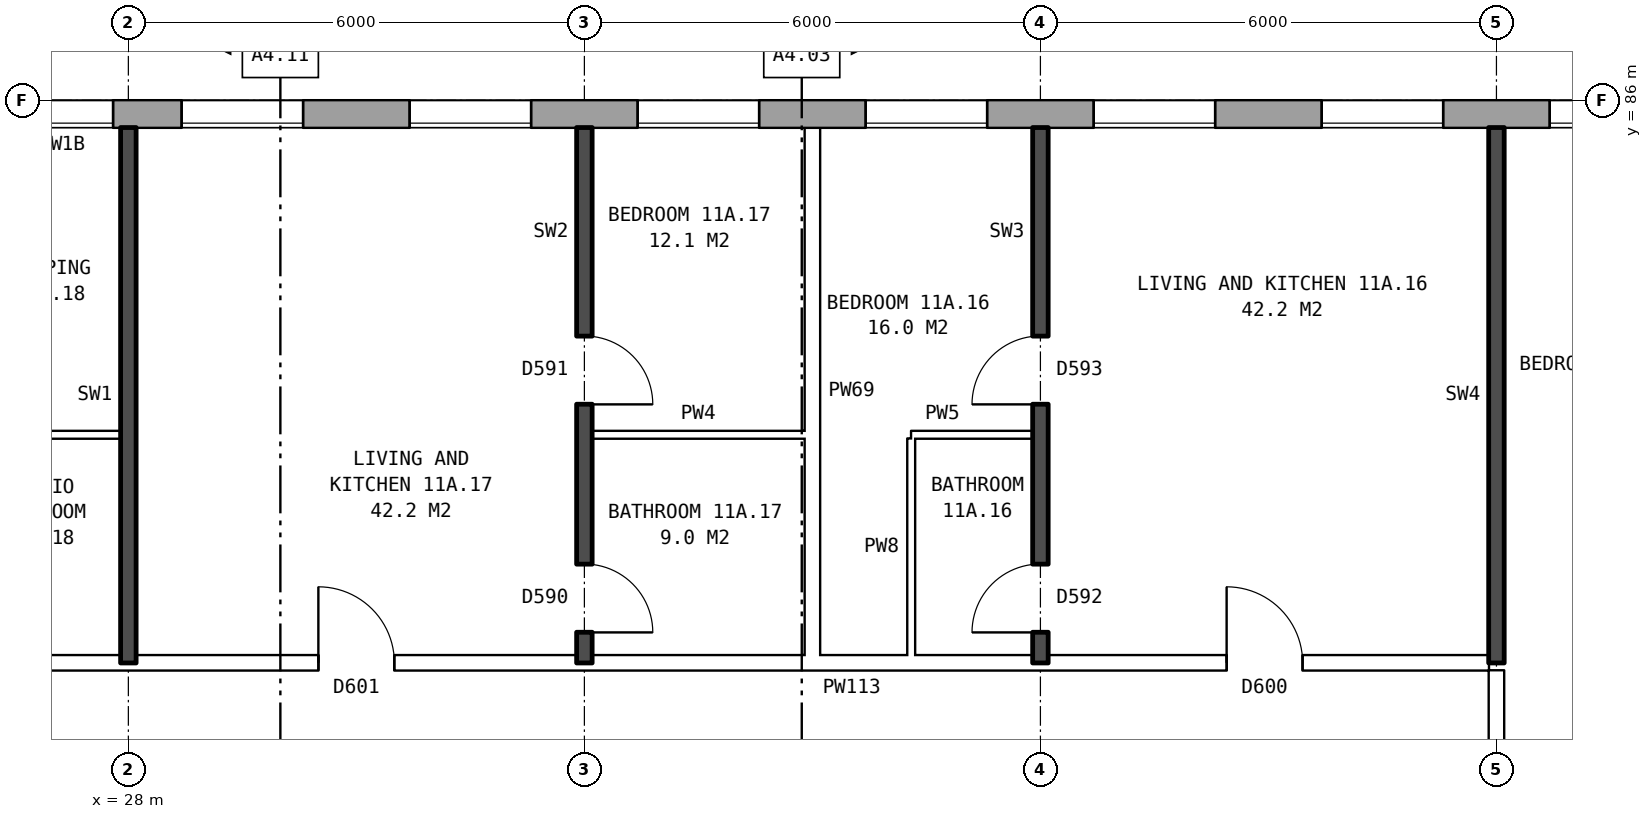
"""IFC4 building model, lengths in metres.
Left out: names, types, materials, properties, quantities, classifications, styles, units other than length and angle.
Written with IfcOpenShell. Run it as: python <this file> out.ifc"""

import sys

from ifc_helpers import new_model, si_unit, direction, frame, frame_2d, origin, place, context, subcontext, project, spatial, rectangle, extrude, element, fill, save


model = new_model("IFC4")
c1 = context("Model", 3, precision=1e-05, world=origin(), true_north=direction((0.0, 1.0)))
c2 = subcontext(c1, "Body", "Model", "MODEL_VIEW")
j1 = project(units=[si_unit("LENGTHUNIT", "METRE"), si_unit("PLANEANGLEUNIT", "RADIAN")], contexts=[c1])
p1 = place(None, origin())
s1 = spatial("IfcSite", under=j1, at=p1, CompositionType="ELEMENT")
p2 = place(p1, origin())
s2 = spatial("IfcBuilding", under=s1, at=p2, CompositionType="ELEMENT")
p3 = place(p2, frame((0.0, 0.0, 44.3)))
s3 = spatial("IfcBuildingStorey", under=s2, at=p3, CompositionType="ELEMENT", Elevation=44.3)
p4 = place(p3, frame((72.925, 85.82, 0.0), z_axis=(0.0, 0.0, 1.0), x_axis=(-1.0, 0.0, 0.0)))
e1 = element("IfcWall", 1, at=p4, inside=s3, PredefinedType="STANDARD", context=c2, shape_type="SweptSolid", body=[
    extrude(rectangle(XDim=48.351, YDim=0.36, at=frame_2d((24.175, 0.0))), origin(), (0.0, 0.0, 1.0), 2.85),
])
p5 = place(p4, frame((0.65, 0.0, 0.8)))
e2 = element("IfcOpeningElement", 2, at=p5, cuts=e1, PredefinedType="OPENING", context=c2, shape_type="SweptSolid", body=[
    extrude(rectangle(XDim=0.6, YDim=0.9, at=frame_2d((0.3, 0.45))), frame((0.0, 0.19, 0.0), z_axis=(0.0, -1.0, 0.0), x_axis=(1.0, 0.0, 0.0)), (0.0, 0.0, 1.0), 0.38),
])
p6 = place(p4, frame((3.625, 0.0, 0.8)))
e3 = element("IfcOpeningElement", 3, at=p6, cuts=e1, PredefinedType="OPENING", context=c2, shape_type="SweptSolid", body=[
    extrude(rectangle(XDim=1.6, YDim=1.8, at=frame_2d((0.8, 0.9))), frame((0.0, 0.19, 0.0), z_axis=(0.0, -1.0, 0.0), x_axis=(1.0, 0.0, 0.0)), (0.0, 0.0, 1.0), 0.38),
])
p7 = place(p4, frame((6.625, 0.0, 0.8)))
e4 = element("IfcOpeningElement", 4, at=p7, cuts=e1, PredefinedType="OPENING", context=c2, shape_type="SweptSolid", body=[
    extrude(rectangle(XDim=1.6, YDim=1.8, at=frame_2d((0.8, 0.9))), frame((0.0, 0.19, 0.0), z_axis=(0.0, -1.0, 0.0), x_axis=(1.0, 0.0, 0.0)), (0.0, 0.0, 1.0), 0.38),
])
p8 = place(p4, frame((9.625, 0.0, 0.8)))
e5 = element("IfcOpeningElement", 5, at=p8, cuts=e1, PredefinedType="OPENING", context=c2, shape_type="SweptSolid", body=[
    extrude(rectangle(XDim=1.6, YDim=1.8, at=frame_2d((0.8, 0.9))), frame((0.0, 0.19, 0.0), z_axis=(0.0, -1.0, 0.0), x_axis=(1.0, 0.0, 0.0)), (0.0, 0.0, 1.0), 0.38),
])
p9 = place(p4, frame((12.625, 0.0, 0.8)))
e6 = element("IfcOpeningElement", 6, at=p9, cuts=e1, PredefinedType="OPENING", context=c2, shape_type="SweptSolid", body=[
    extrude(rectangle(XDim=1.6, YDim=1.8, at=frame_2d((0.8, 0.9))), frame((0.0, 0.19, 0.0), z_axis=(0.0, -1.0, 0.0), x_axis=(1.0, 0.0, 0.0)), (0.0, 0.0, 1.0), 0.38),
])
p10 = place(p4, frame((15.625, 0.0, 0.8)))
e7 = element("IfcOpeningElement", 7, at=p10, cuts=e1, PredefinedType="OPENING", context=c2, shape_type="SweptSolid", body=[
    extrude(rectangle(XDim=1.6, YDim=1.8, at=frame_2d((0.8, 0.9))), frame((0.0, 0.19, 0.0), z_axis=(0.0, -1.0, 0.0), x_axis=(1.0, 0.0, 0.0)), (0.0, 0.0, 1.0), 0.38),
])
p11 = place(p4, frame((18.625, 0.0, 0.8)))
e8 = element("IfcOpeningElement", 8, at=p11, cuts=e1, PredefinedType="OPENING", context=c2, shape_type="SweptSolid", body=[
    extrude(rectangle(XDim=1.6, YDim=1.8, at=frame_2d((0.8, 0.9))), frame((0.0, 0.19, 0.0), z_axis=(0.0, -1.0, 0.0), x_axis=(1.0, 0.0, 0.0)), (0.0, 0.0, 1.0), 0.38),
])
p12 = place(p4, frame((21.625, 0.0, 0.8)))
e9 = element("IfcOpeningElement", 9, at=p12, cuts=e1, PredefinedType="OPENING", context=c2, shape_type="SweptSolid", body=[
    extrude(rectangle(XDim=1.6, YDim=1.8, at=frame_2d((0.8, 0.9))), frame((0.0, 0.19, 0.0), z_axis=(0.0, -1.0, 0.0), x_axis=(1.0, 0.0, 0.0)), (0.0, 0.0, 1.0), 0.38),
])
p13 = place(p4, frame((24.625, 0.0, 0.8)))
e10 = element("IfcOpeningElement", 10, at=p13, cuts=e1, PredefinedType="OPENING", context=c2, shape_type="SweptSolid", body=[
    extrude(rectangle(XDim=1.6, YDim=1.8, at=frame_2d((0.8, 0.9))), frame((0.0, 0.19, 0.0), z_axis=(0.0, -1.0, 0.0), x_axis=(1.0, 0.0, 0.0)), (0.0, 0.0, 1.0), 0.38),
])
p14 = place(p4, frame((27.625, 0.0, 0.8)))
e11 = element("IfcOpeningElement", 11, at=p14, cuts=e1, PredefinedType="OPENING", context=c2, shape_type="SweptSolid", body=[
    extrude(rectangle(XDim=1.6, YDim=1.8, at=frame_2d((0.8, 0.9))), frame((0.0, 0.19, 0.0), z_axis=(0.0, -1.0, 0.0), x_axis=(1.0, 0.0, 0.0)), (0.0, 0.0, 1.0), 0.38),
])
p15 = place(p4, frame((30.625, 0.0, 0.8)))
e12 = element("IfcOpeningElement", 12, at=p15, cuts=e1, PredefinedType="OPENING", context=c2, shape_type="SweptSolid", body=[
    extrude(rectangle(XDim=1.6, YDim=1.8, at=frame_2d((0.8, 0.9))), frame((0.0, 0.19, 0.0), z_axis=(0.0, -1.0, 0.0), x_axis=(1.0, 0.0, 0.0)), (0.0, 0.0, 1.0), 0.38),
])
p16 = place(p4, frame((33.625, 0.0, 0.8)))
e13 = element("IfcOpeningElement", 13, at=p16, cuts=e1, PredefinedType="OPENING", context=c2, shape_type="SweptSolid", body=[
    extrude(rectangle(XDim=1.6, YDim=1.8, at=frame_2d((0.8, 0.9))), frame((0.0, 0.19, 0.0), z_axis=(0.0, -1.0, 0.0), x_axis=(1.0, 0.0, 0.0)), (0.0, 0.0, 1.0), 0.38),
])
p17 = place(p4, frame((36.625, 0.0, 0.8)))
e14 = element("IfcOpeningElement", 14, at=p17, cuts=e1, PredefinedType="OPENING", context=c2, shape_type="SweptSolid", body=[
    extrude(rectangle(XDim=1.6, YDim=1.8, at=frame_2d((0.8, 0.9))), frame((0.0, 0.19, 0.0), z_axis=(0.0, -1.0, 0.0), x_axis=(1.0, 0.0, 0.0)), (0.0, 0.0, 1.0), 0.38),
])
p18 = place(p4, frame((39.625, 0.0, 0.8)))
e15 = element("IfcOpeningElement", 15, at=p18, cuts=e1, PredefinedType="OPENING", context=c2, shape_type="SweptSolid", body=[
    extrude(rectangle(XDim=1.6, YDim=1.8, at=frame_2d((0.8, 0.9))), frame((0.0, 0.19, 0.0), z_axis=(0.0, -1.0, 0.0), x_axis=(1.0, 0.0, 0.0)), (0.0, 0.0, 1.0), 0.38),
])
p19 = place(p4, frame((42.625, 0.0, 0.8)))
e16 = element("IfcOpeningElement", 16, at=p19, cuts=e1, PredefinedType="OPENING", context=c2, shape_type="SweptSolid", body=[
    extrude(rectangle(XDim=1.6, YDim=1.8, at=frame_2d((0.8, 0.9))), frame((0.0, 0.19, 0.0), z_axis=(0.0, -1.0, 0.0), x_axis=(1.0, 0.0, 0.0)), (0.0, 0.0, 1.0), 0.38),
])
p20 = place(p4, frame((45.125, 0.0, 0.8)))
e17 = element("IfcOpeningElement", 17, at=p20, cuts=e1, PredefinedType="OPENING", context=c2, shape_type="SweptSolid", body=[
    extrude(rectangle(XDim=1.2, YDim=1.8, at=frame_2d((0.6, 0.9))), frame((0.0, 0.19, 0.0), z_axis=(0.0, -1.0, 0.0), x_axis=(1.0, 0.0, 0.0)), (0.0, 0.0, 1.0), 0.38),
])
p21 = place(p4, frame((1.55, 0.0, 0.8)))
e18 = element("IfcOpeningElement", 18, at=p21, cuts=e1, PredefinedType="OPENING", context=c2, shape_type="SweptSolid", body=[
    extrude(rectangle(XDim=1.0, YDim=1.5, at=frame_2d((0.5, 0.75))), frame((0.0, 0.19, 0.0), z_axis=(0.0, -1.0, 0.0), x_axis=(1.0, 0.0, 0.0)), (0.0, 0.0, 1.0), 0.38),
])
p22 = place(p4, frame((46.625, 0.0, 0.8)))
e19 = element("IfcOpeningElement", 19, at=p22, cuts=e1, PredefinedType="OPENING", context=c2, shape_type="SweptSolid", body=[
    extrude(rectangle(XDim=1.0, YDim=0.9, at=frame_2d((0.5, 0.45))), frame((0.0, 0.19, 0.0), z_axis=(0.0, -1.0, 0.0), x_axis=(1.0, 0.0, 0.0)), (0.0, 0.0, 1.0), 0.38),
])
p23 = place(p3, frame((21.86, 78.6, 0.0), z_axis=(0.0, 0.0, 1.0), x_axis=(1.0, 0.0, 0.0)))
e20 = element("IfcWall", 20, at=p23, inside=s3, PredefinedType="PARTITIONING", context=c2, shape_type="SweptSolid", body=[
    extrude(rectangle(XDim=24.04, YDim=0.2, at=frame_2d((12.02, 0.0))), origin(), (0.0, 0.0, 1.0), 2.85),
])
p24 = place(p23, frame((20.59, 0.0, 0.0)))
e21 = element("IfcOpeningElement", 21, at=p24, cuts=e20, PredefinedType="OPENING", context=c2, shape_type="SweptSolid", body=[
    extrude(rectangle(XDim=1.0, YDim=2.1, at=frame_2d((0.5, 1.05))), frame((0.0, 0.11, 0.0), z_axis=(0.0, -1.0, 0.0), x_axis=(1.0, 0.0, 0.0)), (0.0, 0.0, 1.0), 0.22),
])
p25 = place(p23, frame((8.64, 0.0, 0.0)))
e22 = element("IfcOpeningElement", 22, at=p25, cuts=e20, PredefinedType="OPENING", context=c2, shape_type="SweptSolid", body=[
    extrude(rectangle(XDim=1.0, YDim=2.1, at=frame_2d((0.5, 1.05))), frame((0.0, 0.11, 0.0), z_axis=(0.0, -1.0, 0.0), x_axis=(1.0, 0.0, 0.0)), (0.0, 0.0, 1.0), 0.22),
])
p26 = place(p23, frame((1.37, 0.0, 0.0)))
e23 = element("IfcOpeningElement", 23, at=p26, cuts=e20, PredefinedType="OPENING", context=c2, shape_type="SweptSolid", body=[
    extrude(rectangle(XDim=1.0, YDim=2.1, at=frame_2d((0.5, 1.05))), frame((0.0, 0.11, 0.0), z_axis=(0.0, -1.0, 0.0), x_axis=(1.0, 0.0, 0.0)), (0.0, 0.0, 1.0), 0.22),
])
p27 = place(p3, frame((25.6, 81.6, 0.0), z_axis=(0.0, 0.0, 1.0), x_axis=(1.0, 0.0, 0.0)))
e24 = element("IfcWall", 24, at=p27, inside=s3, PredefinedType="PARTITIONING", context=c2, shape_type="SweptSolid", body=[
    extrude(rectangle(XDim=2.3, YDim=0.1, at=frame_2d((1.15, 0.0))), origin(), (0.0, 0.0, 1.0), 2.85),
])
p28 = place(p3, frame((34.1, 81.6, 0.0), z_axis=(0.0, 0.0, 1.0), x_axis=(1.0, 0.0, 0.0)))
e25 = element("IfcWall", 25, at=p28, inside=s3, PredefinedType="PARTITIONING", context=c2, shape_type="SweptSolid", body=[
    extrude(rectangle(XDim=2.8, YDim=0.1, at=frame_2d((1.4, 0.0))), origin(), (0.0, 0.0, 1.0), 2.85),
])
p29 = place(p3, frame((38.3, 81.6, 0.0), z_axis=(0.0, 0.0, 1.0), x_axis=(1.0, 0.0, 0.0)))
e26 = element("IfcWall", 26, at=p29, inside=s3, PredefinedType="PARTITIONING", context=c2, shape_type="SweptSolid", body=[
    extrude(rectangle(XDim=1.6, YDim=0.1, at=frame_2d((0.8, 0.0))), origin(), (0.0, 0.0, 1.0), 2.85),
])
p30 = place(p3, frame((28.0, 78.6, 0.0), z_axis=(0.0, 0.0, 1.0), x_axis=(0.0, 1.0, 0.0)))
e27 = element("IfcWall", 27, at=p30, inside=s3, PredefinedType="SOLIDWALL", context=c2, shape_type="SweptSolid", body=[
    extrude(rectangle(XDim=7.04, YDim=0.2, at=frame_2d((3.52, 0.0))), origin(), (0.0, 0.0, 1.0), 2.85),
])
p31 = place(p3, frame((34.0, 78.6, 0.0), z_axis=(0.0, 0.0, 1.0), x_axis=(0.0, 1.0, 0.0)))
e28 = element("IfcWall", 28, at=p31, inside=s3, PredefinedType="SOLIDWALL", context=c2, shape_type="SweptSolid", body=[
    extrude(rectangle(XDim=7.04, YDim=0.2, at=frame_2d((3.52, 0.0))), origin(), (0.0, 0.0, 1.0), 2.85),
])
p32 = place(p31, frame((3.4, 0.0, 0.0)))
e29 = element("IfcOpeningElement", 29, at=p32, cuts=e28, PredefinedType="OPENING", context=c2, shape_type="SweptSolid", body=[
    extrude(rectangle(XDim=0.9, YDim=2.1, at=frame_2d((0.45, 1.05))), frame((0.0, 0.11, 0.0), z_axis=(0.0, -1.0, 0.0), x_axis=(1.0, 0.0, 0.0)), (0.0, 0.0, 1.0), 0.22),
])
p33 = place(p31, frame((0.4, 0.0, 0.0)))
e30 = element("IfcOpeningElement", 30, at=p33, cuts=e28, PredefinedType="OPENING", context=c2, shape_type="SweptSolid", body=[
    extrude(rectangle(XDim=0.9, YDim=2.1, at=frame_2d((0.45, 1.05))), frame((0.0, 0.11, 0.0), z_axis=(0.0, -1.0, 0.0), x_axis=(1.0, 0.0, 0.0)), (0.0, 0.0, 1.0), 0.22),
])
p34 = place(p3, frame((37.0, 78.7, 0.0), z_axis=(0.0, 0.0, 1.0), x_axis=(0.0, 1.0, 0.0)))
e31 = element("IfcWall", 31, at=p34, inside=s3, PredefinedType="PARTITIONING", context=c2, shape_type="SweptSolid", body=[
    extrude(rectangle(XDim=6.94, YDim=0.2, at=frame_2d((3.47, 0.0))), origin(), (0.0, 0.0, 1.0), 2.85),
])
p35 = place(p3, frame((38.3, 78.7, 0.0), z_axis=(0.0, 0.0, 1.0), x_axis=(0.0, 1.0, 0.0)))
e32 = element("IfcWall", 32, at=p35, inside=s3, PredefinedType="PARTITIONING", context=c2, shape_type="SweptSolid", body=[
    extrude(rectangle(XDim=2.85, YDim=0.1, at=frame_2d((1.425, 0.0))), origin(), (0.0, 0.0, 1.0), 2.85),
])
p36 = place(p3, frame((40.0, 78.6, 0.0), z_axis=(0.0, 0.0, 1.0), x_axis=(0.0, 1.0, 0.0)))
e33 = element("IfcWall", 33, at=p36, inside=s3, PredefinedType="SOLIDWALL", context=c2, shape_type="SweptSolid", body=[
    extrude(rectangle(XDim=7.04, YDim=0.2, at=frame_2d((3.52, 0.0))), origin(), (0.0, 0.0, 1.0), 2.85),
])
p37 = place(p36, frame((3.4, 0.0, 0.0)))
e34 = element("IfcOpeningElement", 34, at=p37, cuts=e33, PredefinedType="OPENING", context=c2, shape_type="SweptSolid", body=[
    extrude(rectangle(XDim=0.9, YDim=2.1, at=frame_2d((0.45, 1.05))), frame((0.0, 0.11, 0.0), z_axis=(0.0, -1.0, 0.0), x_axis=(1.0, 0.0, 0.0)), (0.0, 0.0, 1.0), 0.22),
])
p38 = place(p36, frame((0.4, 0.0, 0.0)))
e35 = element("IfcOpeningElement", 35, at=p38, cuts=e33, PredefinedType="OPENING", context=c2, shape_type="SweptSolid", body=[
    extrude(rectangle(XDim=0.9, YDim=2.1, at=frame_2d((0.45, 1.05))), frame((0.0, 0.11, 0.0), z_axis=(0.0, -1.0, 0.0), x_axis=(1.0, 0.0, 0.0)), (0.0, 0.0, 1.0), 0.22),
])
p39 = place(p3, frame((46.0, 76.3, 0.0), z_axis=(0.0, 0.0, 1.0), x_axis=(0.0, 1.0, 0.0)))
e36 = element("IfcWall", 36, at=p39, inside=s3, PredefinedType="PARTITIONING", context=c2, shape_type="SweptSolid", body=[
    extrude(rectangle(XDim=2.2, YDim=0.2, at=frame_2d((1.1, 0.0))), origin(), (0.0, 0.0, 1.0), 2.85),
])
p40 = place(p3, frame((46.0, 78.6, 0.0), z_axis=(0.0, 0.0, 1.0), x_axis=(0.0, 1.0, 0.0)))
e37 = element("IfcWall", 37, at=p40, inside=s3, PredefinedType="SOLIDWALL", context=c2, shape_type="SweptSolid", body=[
    extrude(rectangle(XDim=7.04, YDim=0.2, at=frame_2d((3.52, 0.0))), origin(), (0.0, 0.0, 1.0), 2.85),
])
p41 = place(p13, origin())
e38 = element("IfcWindow", 38, at=p41, inside=s3, PartitioningType="SINGLE_PANEL", PredefinedType="WINDOW", context=c2, shape_type="SweptSolid", body=[
    extrude(rectangle(XDim=1.6, YDim=1.8, at=frame_2d((0.8, 0.9))), frame((0.0, 0.15, 0.0), z_axis=(0.0, -1.0, 0.0), x_axis=(1.0, 0.0, 0.0)), (0.0, 0.0, 1.0), 0.06),
])
fill(e10, e38)
p42 = place(p14, origin())
e39 = element("IfcWindow", 39, at=p42, inside=s3, PartitioningType="SINGLE_PANEL", PredefinedType="WINDOW", context=c2, shape_type="SweptSolid", body=[
    extrude(rectangle(XDim=1.6, YDim=1.8, at=frame_2d((0.8, 0.9))), frame((0.0, 0.15, 0.0), z_axis=(0.0, -1.0, 0.0), x_axis=(1.0, 0.0, 0.0)), (0.0, 0.0, 1.0), 0.06),
])
fill(e11, e39)
p43 = place(p15, origin())
e40 = element("IfcWindow", 40, at=p43, inside=s3, PartitioningType="SINGLE_PANEL", PredefinedType="WINDOW", context=c2, shape_type="SweptSolid", body=[
    extrude(rectangle(XDim=1.6, YDim=1.8, at=frame_2d((0.8, 0.9))), frame((0.0, 0.15, 0.0), z_axis=(0.0, -1.0, 0.0), x_axis=(1.0, 0.0, 0.0)), (0.0, 0.0, 1.0), 0.06),
])
fill(e12, e40)
p44 = place(p16, origin())
e41 = element("IfcWindow", 41, at=p44, inside=s3, PartitioningType="SINGLE_PANEL", PredefinedType="WINDOW", context=c2, shape_type="SweptSolid", body=[
    extrude(rectangle(XDim=1.6, YDim=1.8, at=frame_2d((0.8, 0.9))), frame((0.0, 0.15, 0.0), z_axis=(0.0, -1.0, 0.0), x_axis=(1.0, 0.0, 0.0)), (0.0, 0.0, 1.0), 0.06),
])
fill(e13, e41)
p45 = place(p17, origin())
e42 = element("IfcWindow", 42, at=p45, inside=s3, PartitioningType="SINGLE_PANEL", PredefinedType="WINDOW", context=c2, shape_type="SweptSolid", body=[
    extrude(rectangle(XDim=1.6, YDim=1.8, at=frame_2d((0.8, 0.9))), frame((0.0, 0.15, 0.0), z_axis=(0.0, -1.0, 0.0), x_axis=(1.0, 0.0, 0.0)), (0.0, 0.0, 1.0), 0.06),
])
fill(e14, e42)
p46 = place(p18, origin())
e43 = element("IfcWindow", 43, at=p46, inside=s3, PartitioningType="SINGLE_PANEL", PredefinedType="WINDOW", context=c2, shape_type="SweptSolid", body=[
    extrude(rectangle(XDim=1.6, YDim=1.8, at=frame_2d((0.8, 0.9))), frame((0.0, 0.15, 0.0), z_axis=(0.0, -1.0, 0.0), x_axis=(1.0, 0.0, 0.0)), (0.0, 0.0, 1.0), 0.06),
])
fill(e15, e43)
p47 = place(p19, origin())
e44 = element("IfcWindow", 44, at=p47, inside=s3, PartitioningType="SINGLE_PANEL", PredefinedType="WINDOW", context=c2, shape_type="SweptSolid", body=[
    extrude(rectangle(XDim=1.6, YDim=1.8, at=frame_2d((0.8, 0.9))), frame((0.0, 0.15, 0.0), z_axis=(0.0, -1.0, 0.0), x_axis=(1.0, 0.0, 0.0)), (0.0, 0.0, 1.0), 0.06),
])
fill(e16, e44)
p48 = place(p20, origin())
e45 = element("IfcWindow", 45, at=p48, inside=s3, PartitioningType="SINGLE_PANEL", PredefinedType="WINDOW", context=c2, shape_type="SweptSolid", body=[
    extrude(rectangle(XDim=1.2, YDim=1.8, at=frame_2d((0.6, 0.9))), frame((0.0, 0.15, 0.0), z_axis=(0.0, -1.0, 0.0), x_axis=(1.0, 0.0, 0.0)), (0.0, 0.0, 1.0), 0.06),
])
fill(e17, e45)
p49 = place(p37, origin())
e46 = element("IfcDoor", 46, at=p49, inside=s3, OperationType="SINGLE_SWING_LEFT", PredefinedType="DOOR", context=c2, shape_type="SweptSolid", body=[
    extrude(rectangle(XDim=0.9, YDim=2.1, at=frame_2d((0.45, 1.05))), frame((0.0, 0.025, 0.0), z_axis=(0.0, -1.0, 0.0), x_axis=(1.0, 0.0, 0.0)), (0.0, 0.0, 1.0), 0.05),
])
fill(e34, e46)
p50 = place(p24, origin())
e47 = element("IfcDoor", 47, at=p50, inside=s3, OperationType="SINGLE_SWING_LEFT", PredefinedType="DOOR", context=c2, shape_type="SweptSolid", body=[
    extrude(rectangle(XDim=1.0, YDim=2.1, at=frame_2d((0.5, 1.05))), frame((0.0, 0.025, 0.0), z_axis=(0.0, -1.0, 0.0), x_axis=(1.0, 0.0, 0.0)), (0.0, 0.0, 1.0), 0.05),
])
fill(e21, e47)
p51 = place(p38, origin())
e48 = element("IfcDoor", 48, at=p51, inside=s3, OperationType="SINGLE_SWING_LEFT", PredefinedType="DOOR", context=c2, shape_type="SweptSolid", body=[
    extrude(rectangle(XDim=0.9, YDim=2.1, at=frame_2d((0.45, 1.05))), frame((0.0, 0.025, 0.0), z_axis=(0.0, -1.0, 0.0), x_axis=(1.0, 0.0, 0.0)), (0.0, 0.0, 1.0), 0.05),
])
fill(e35, e48)
p52 = place(p32, frame((0.9, 0.0, 0.0), z_axis=(0.0, 0.0, 1.0), x_axis=(-1.0, 0.0, 0.0)))
e49 = element("IfcDoor", 49, at=p52, inside=s3, OperationType="SINGLE_SWING_RIGHT", PredefinedType="DOOR", context=c2, shape_type="SweptSolid", body=[
    extrude(rectangle(XDim=0.9, YDim=2.1, at=frame_2d((0.45, 1.05))), frame((0.0, 0.025, 0.0), z_axis=(0.0, -1.0, 0.0), x_axis=(1.0, 0.0, 0.0)), (0.0, 0.0, 1.0), 0.05),
])
fill(e29, e49)
p53 = place(p25, origin())
e50 = element("IfcDoor", 50, at=p53, inside=s3, OperationType="SINGLE_SWING_LEFT", PredefinedType="DOOR", context=c2, shape_type="SweptSolid", body=[
    extrude(rectangle(XDim=1.0, YDim=2.1, at=frame_2d((0.5, 1.05))), frame((0.0, 0.025, 0.0), z_axis=(0.0, -1.0, 0.0), x_axis=(1.0, 0.0, 0.0)), (0.0, 0.0, 1.0), 0.05),
])
fill(e22, e50)
p54 = place(p33, frame((0.9, 0.0, 0.0), z_axis=(0.0, 0.0, 1.0), x_axis=(-1.0, 0.0, 0.0)))
e51 = element("IfcDoor", 51, at=p54, inside=s3, OperationType="SINGLE_SWING_RIGHT", PredefinedType="DOOR", context=c2, shape_type="SweptSolid", body=[
    extrude(rectangle(XDim=0.9, YDim=2.1, at=frame_2d((0.45, 1.05))), frame((0.0, 0.025, 0.0), z_axis=(0.0, -1.0, 0.0), x_axis=(1.0, 0.0, 0.0)), (0.0, 0.0, 1.0), 0.05),
])
fill(e30, e51)
save(model, sys.argv[1])
